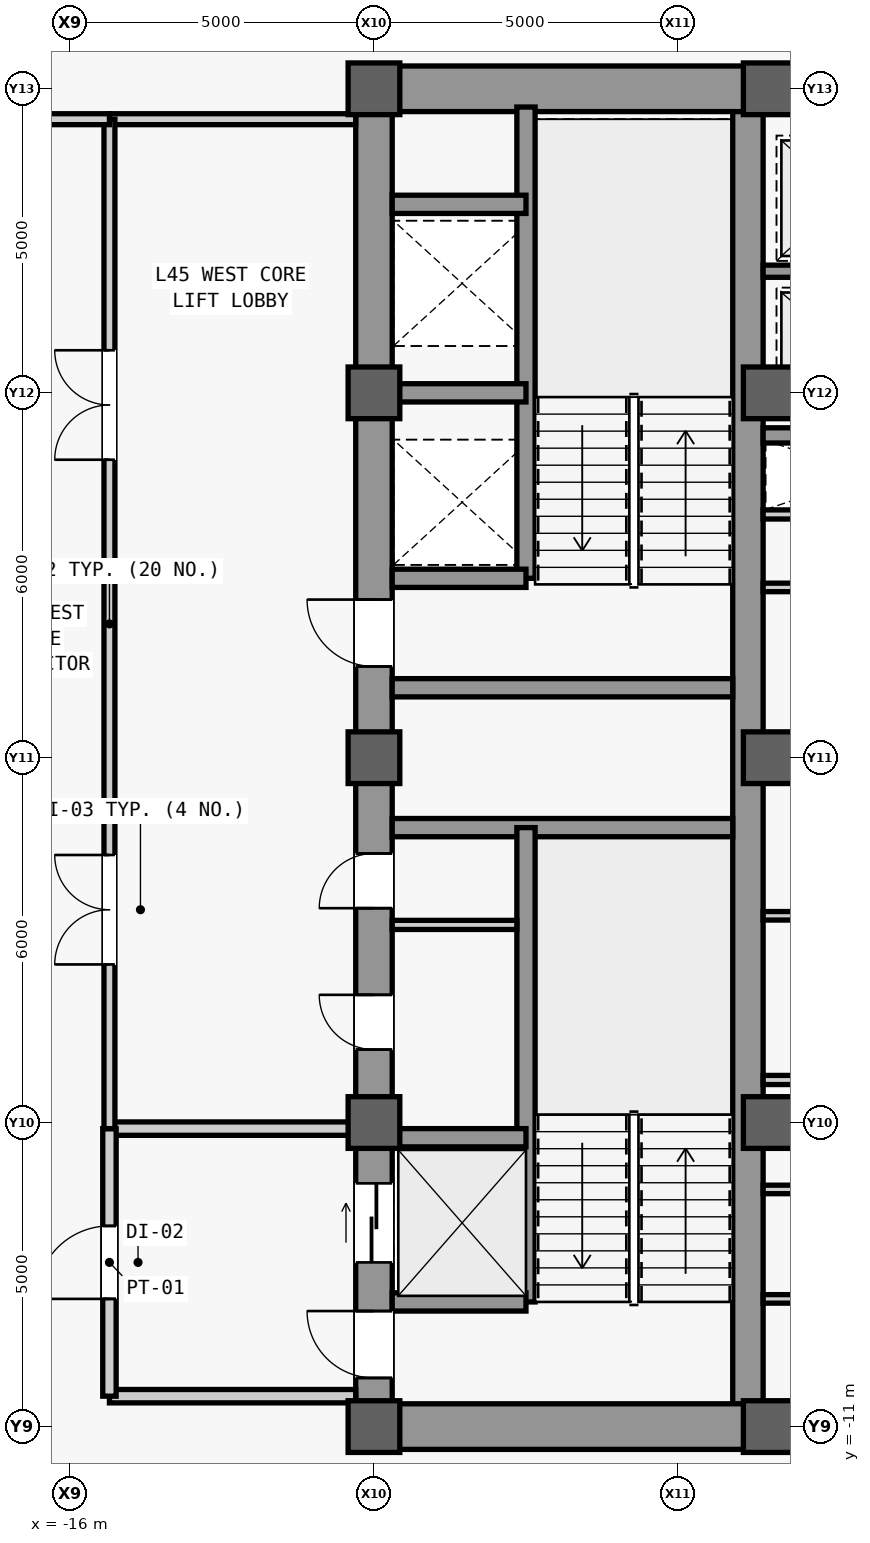
"""IFC4 building model, lengths in metres.
Left out: names, types, materials, properties, quantities, classifications, styles, units other than length and angle.
Written with IfcOpenShell. Run it as: python <this file> out.ifc"""

import sys

from ifc_helpers import new_model, si_unit, direction, frame, frame_2d, origin, origin_2d, place, context, subcontext, project, spatial, rectangle, extrude, source, transform, mapped, element, fill, save


model = new_model("IFC4")
c1 = context("Model", 3, precision=1e-05, world=origin(), true_north=direction((0.0, 1.0)))
c2 = subcontext(c1, "Body", "Model", "MODEL_VIEW")
j1 = project(units=[si_unit("LENGTHUNIT", "METRE"), si_unit("PLANEANGLEUNIT", "RADIAN")], contexts=[c1])
p1 = place(None, origin())
s1 = spatial("IfcSite", under=j1, at=p1, CompositionType="ELEMENT")
p2 = place(p1, origin())
s2 = spatial("IfcBuilding", under=s1, at=p2, CompositionType="ELEMENT")
p3 = place(p2, frame((0.0, 0.0, 195.1)))
s3 = spatial("IfcBuildingStorey", under=s2, at=p3, CompositionType="ELEMENT", Elevation=195.1)
m1 = source(origin(), c2, "Body", "SweptSolid", [
    extrude(rectangle(XDim=22.0, YDim=0.6, at=frame_2d((11.0, 0.0))), origin(), (0.0, 0.0, 1.0), 3.78),
])
p4 = place(p3, frame((-11.0, -11.0, 0.0), z_axis=(0.0, 0.0, 1.0), x_axis=(0.0, 1.0, 0.0)))
e1 = element("IfcWall", 1, at=p4, inside=s3, PredefinedType="SHEAR", context=c2, shape_type="MappedRepresentation", body=[
    mapped(m1, transform((0.0, 0.0, 0.0), scale=1.0)),
])
m2 = source(origin(), c2, "Body", "SweptSolid", [
    extrude(rectangle(XDim=1.1, YDim=2.2, at=frame_2d((0.55, 1.1))), frame((0.0, 0.31, 0.0), z_axis=(0.0, -1.0, 0.0), x_axis=(1.0, 0.0, 0.0)), (0.0, 0.0, 1.0), 0.62),
])
p5 = place(p4, frame((0.8, 0.0, 0.0)))
e2 = element("IfcOpeningElement", 2, at=p5, cuts=e1, PredefinedType="OPENING", context=c2, shape_type="MappedRepresentation", body=[
    mapped(m2, transform((0.0, 0.0, 0.0), scale=1.0)),
])
p6 = place(p4, frame((12.5, 0.0, 0.0)))
e3 = element("IfcOpeningElement", 3, at=p6, cuts=e1, PredefinedType="OPENING", context=c2, shape_type="MappedRepresentation", body=[
    mapped(m2, transform((0.0, 0.0, 0.0), scale=1.0)),
])
m3 = source(origin(), c2, "Body", "SweptSolid", [
    extrude(rectangle(XDim=0.9, YDim=2.15, at=frame_2d((0.45, 1.075))), frame((0.0, 0.31, 0.0), z_axis=(0.0, -1.0, 0.0), x_axis=(1.0, 0.0, 0.0)), (0.0, 0.0, 1.0), 0.62),
])
p7 = place(p4, frame((6.2, 0.0, 0.0)))
e4 = element("IfcOpeningElement", 4, at=p7, cuts=e1, PredefinedType="OPENING", context=c2, shape_type="MappedRepresentation", body=[
    mapped(m3, transform((0.0, 0.0, 0.0), scale=1.0)),
])
p8 = place(p4, frame((8.525, 0.0, 0.0)))
e5 = element("IfcOpeningElement", 5, at=p8, cuts=e1, PredefinedType="OPENING", context=c2, shape_type="MappedRepresentation", body=[
    mapped(m3, transform((0.0, 0.0, 0.0), scale=1.0)),
])
m4 = source(origin(), c2, "Body", "SweptSolid", [
    extrude(rectangle(XDim=1.3, YDim=2.3, at=frame_2d((0.65, 1.15))), frame((0.0, 0.31, 0.0), z_axis=(0.0, -1.0, 0.0), x_axis=(1.0, 0.0, 0.0)), (0.0, 0.0, 1.0), 0.62),
])
p9 = place(p4, frame((2.7, 0.0, 0.0)))
e6 = element("IfcOpeningElement", 6, at=p9, cuts=e1, PredefinedType="OPENING", context=c2, shape_type="MappedRepresentation", body=[
    mapped(m4, transform((0.0, 0.0, 0.0), scale=1.0)),
])
m5 = source(origin(), c2, "Body", "SweptSolid", [
    extrude(rectangle(XDim=21.4, YDim=0.5, at=frame_2d((10.7, 0.0))), origin(), (0.0, 0.0, 1.0), 3.78),
])
p10 = place(p3, frame((-4.85, -10.7, 0.0), z_axis=(0.0, 0.0, 1.0), x_axis=(0.0, 1.0, 0.0)))
e7 = element("IfcWall", 7, at=p10, inside=s3, PredefinedType="SHEAR", context=c2, shape_type="MappedRepresentation", body=[
    mapped(m5, transform((0.0, 0.0, 0.0), scale=1.0)),
])
m6 = source(origin(), c2, "Body", "SweptSolid", [
    extrude(rectangle(XDim=5.85, YDim=0.75, at=frame_2d((2.925, 0.0))), origin(), (0.0, 0.0, 1.0), 3.78),
])
for number, where, z_axis, x_axis in (
    (8, (-10.7, -11.0, 0.0), (0.0, 0.0, 1.0), (1.0, 0.0, 0.0)),
    (9, (-10.7, 11.0, 0.0), (0.0, 0.0, 1.0), (1.0, 0.0, 0.0)),
):
    element("IfcWall", number, at=place(p3, frame(where, z_axis=z_axis, x_axis=x_axis)), inside=s3, PredefinedType="SHEAR", context=c2, shape_type="MappedRepresentation", body=[
        mapped(m6, transform((0.0, 0.0, 0.0), scale=1.0)),
    ])
m7 = source(origin(), c2, "Body", "SweptSolid", [
    extrude(rectangle(XDim=5.6, YDim=0.3, at=frame_2d((2.8, 0.0))), origin(), (0.0, 0.0, 1.0), 3.78),
])
for number, where, z_axis, x_axis in (
    (10, (-10.7, -1.15, 0.0), (0.0, 0.0, 1.0), (1.0, 0.0, 0.0)),
    (11, (-10.7, 1.15, 0.0), (0.0, 0.0, 1.0), (1.0, 0.0, 0.0)),
):
    element("IfcWall", number, at=place(p3, frame(where, z_axis=z_axis, x_axis=x_axis)), inside=s3, PredefinedType="SHEAR", context=c2, shape_type="MappedRepresentation", body=[
        mapped(m7, transform((0.0, 0.0, 0.0), scale=1.0)),
    ])
m8 = source(origin(), c2, "Body", "SweptSolid", [
    extrude(rectangle(XDim=9.2, YDim=0.5, at=frame_2d((4.6, 0.0))), origin(), (0.0, 0.0, 1.0), 3.78),
])
p11 = place(p3, frame((-4.6, -11.0, 0.0), z_axis=(0.0, 0.0, 1.0), x_axis=(1.0, 0.0, 0.0)))
e12 = element("IfcWall", 12, at=p11, inside=s3, PredefinedType="SHEAR", context=c2, shape_type="MappedRepresentation", body=[
    mapped(m8, transform((0.0, 0.0, 0.0), scale=1.0)),
])
m9 = source(origin(), c2, "Body", "SweptSolid", [
    extrude(rectangle(XDim=1.8, YDim=2.25, at=frame_2d((0.9, 1.125))), frame((0.0, 0.26, 0.0), z_axis=(0.0, -1.0, 0.0), x_axis=(1.0, 0.0, 0.0)), (0.0, 0.0, 1.0), 0.52),
])
p12 = place(p11, frame((3.7, 0.0, 0.0)))
e13 = element("IfcOpeningElement", 13, at=p12, cuts=e12, PredefinedType="OPENING", context=c2, shape_type="MappedRepresentation", body=[
    mapped(m9, transform((0.0, 0.0, 0.0), scale=1.0)),
])
p13 = place(p3, frame((-4.6, 11.0, 0.0), z_axis=(0.0, 0.0, 1.0), x_axis=(1.0, 0.0, 0.0)))
e14 = element("IfcWall", 14, at=p13, inside=s3, PredefinedType="SHEAR", context=c2, shape_type="MappedRepresentation", body=[
    mapped(m8, transform((0.0, 0.0, 0.0), scale=1.0)),
])
p14 = place(p13, frame((3.7, 0.0, 0.0)))
e15 = element("IfcOpeningElement", 15, at=p14, cuts=e14, PredefinedType="OPENING", context=c2, shape_type="MappedRepresentation", body=[
    mapped(m9, transform((0.0, 0.0, 0.0), scale=1.0)),
])
m10 = source(origin(), c2, "Body", "SweptSolid", [
    extrude(rectangle(XDim=0.85, YDim=0.85, at=origin_2d()), origin(), (0.0, 0.0, 1.0), 4.0),
])
for number, where, z_axis, x_axis in (
    (16, (-11.0, -11.0, 0.0), (0.0, 0.0, 1.0), (1.0, 0.0, 0.0)),
    (17, (-11.0, -6.0, 0.0), (0.0, 0.0, 1.0), (1.0, 0.0, 0.0)),
    (18, (-11.0, 0.0, 0.0), (0.0, 0.0, 1.0), (1.0, 0.0, 0.0)),
    (19, (-11.0, 6.0, 0.0), (0.0, 0.0, 1.0), (1.0, 0.0, 0.0)),
    (20, (-11.0, 11.0, 0.0), (0.0, 0.0, 1.0), (1.0, 0.0, 0.0)),
    (21, (-4.5, -11.0, 0.0), (0.0, 0.0, 1.0), (1.0, 0.0, 0.0)),
    (22, (-4.5, -6.0, 0.0), (0.0, 0.0, 1.0), (1.0, 0.0, 0.0)),
    (23, (-4.5, 0.0, 0.0), (0.0, 0.0, 1.0), (1.0, 0.0, 0.0)),
    (24, (-4.5, 6.0, 0.0), (0.0, 0.0, 1.0), (1.0, 0.0, 0.0)),
    (25, (-4.5, 11.0, 0.0), (0.0, 0.0, 1.0), (1.0, 0.0, 0.0)),
):
    element("IfcColumn", number, at=place(p3, frame(where, z_axis=z_axis, x_axis=x_axis)), inside=s3, PredefinedType="COLUMN", context=c2, shape_type="MappedRepresentation", body=[
        mapped(m10, transform((0.0, 0.0, 0.0), scale=1.0)),
    ])
m11 = source(origin(), c2, "Body", "SweptSolid", [
    extrude(rectangle(XDim=7.8, YDim=0.3, at=frame_2d((3.9, 0.0))), origin(), (0.0, 0.0, 1.0), 3.78),
])
p15 = place(p3, frame((-8.5, -8.95, 0.0), z_axis=(0.0, 0.0, 1.0), x_axis=(0.0, 1.0, 0.0)))
e26 = element("IfcWall", 26, at=p15, inside=s3, PredefinedType="SHEAR", context=c2, shape_type="MappedRepresentation", body=[
    mapped(m11, transform((0.0, 0.0, 0.0), scale=1.0)),
])
m12 = source(origin(), c2, "Body", "SweptSolid", [
    extrude(rectangle(XDim=2.2, YDim=0.3, at=frame_2d((1.1, 0.0))), origin(), (0.0, 0.0, 1.0), 3.78),
])
for number, where, z_axis, x_axis in (
    (27, (-10.7, -8.95, 0.0), (0.0, 0.0, 1.0), (1.0, 0.0, 0.0)),
    (28, (-10.7, -6.25, 0.0), (0.0, 0.0, 1.0), (1.0, 0.0, 0.0)),
):
    element("IfcWall", number, at=place(p3, frame(where, z_axis=z_axis, x_axis=x_axis)), inside=s3, PredefinedType="SHEAR", context=c2, shape_type="MappedRepresentation", body=[
        mapped(m12, transform((0.0, 0.0, 0.0), scale=1.0)),
    ])
m13 = source(origin(), c2, "Body", "SweptSolid", [
    extrude(rectangle(XDim=7.75, YDim=0.3, at=frame_2d((3.875, 0.0))), origin(), (0.0, 0.0, 1.0), 3.78),
])
p16 = place(p3, frame((-8.5, 2.95, 0.0), z_axis=(0.0, 0.0, 1.0), x_axis=(0.0, 1.0, 0.0)))
e29 = element("IfcWall", 29, at=p16, inside=s3, PredefinedType="SHEAR", context=c2, shape_type="MappedRepresentation", body=[
    mapped(m13, transform((0.0, 0.0, 0.0), scale=1.0)),
])
for number, where, z_axis, x_axis in (
    (30, (-10.7, 2.95, 0.0), (0.0, 0.0, 1.0), (1.0, 0.0, 0.0)),
    (31, (-10.7, 6.0, 0.0), (0.0, 0.0, 1.0), (1.0, 0.0, 0.0)),
    (32, (-10.7, 9.1, 0.0), (0.0, 0.0, 1.0), (1.0, 0.0, 0.0)),
):
    element("IfcWall", number, at=place(p3, frame(where, z_axis=z_axis, x_axis=x_axis)), inside=s3, PredefinedType="SHEAR", context=c2, shape_type="MappedRepresentation", body=[
        mapped(m12, transform((0.0, 0.0, 0.0), scale=1.0)),
    ])
m14 = source(origin(), c2, "Body", "SweptSolid", [
    extrude(rectangle(XDim=2.05, YDim=0.15, at=frame_2d((1.025, 0.0))), origin(), (0.0, 0.0, 1.0), 3.78),
])
p17 = place(p3, frame((-10.7, -2.75, 0.0), z_axis=(0.0, 0.0, 1.0), x_axis=(1.0, 0.0, 0.0)))
e33 = element("IfcWall", 33, at=p17, inside=s3, PredefinedType="PARTITIONING", context=c2, shape_type="MappedRepresentation", body=[
    mapped(m14, transform((0.0, 0.0, 0.0), scale=1.0)),
])
m15 = source(origin(), c2, "Body", "SweptSolid", [
    extrude(rectangle(XDim=4.05, YDim=0.22, at=frame_2d((2.025, 0.0))), origin(), (0.0, 0.0, 1.0), 3.78),
])
p18 = place(p3, frame((-15.35, -10.5, 0.0), z_axis=(0.0, 0.0, 1.0), x_axis=(1.0, 0.0, 0.0)))
e34 = element("IfcWall", 34, at=p18, inside=s3, PredefinedType="PARTITIONING", context=c2, shape_type="MappedRepresentation", body=[
    mapped(m15, transform((0.0, 0.0, 0.0), scale=1.0)),
])
m16 = source(origin(), c2, "Body", "SweptSolid", [
    extrude(rectangle(XDim=4.05, YDim=0.22, at=frame_2d((2.025, 0.0))), origin(), (0.0, 0.0, 1.0), 3.007),
])
p19 = place(p3, frame((-15.35, -6.1, 0.0), z_axis=(0.0, 0.0, 1.0), x_axis=(1.0, 0.0, 0.0)))
e35 = element("IfcWall", 35, at=p19, inside=s3, PredefinedType="PARTITIONING", context=c2, shape_type="MappedRepresentation", body=[
    mapped(m16, transform((0.0, 0.0, 0.0), scale=1.0)),
])
m17 = source(origin(), c2, "Body", "SweptSolid", [
    extrude(rectangle(XDim=4.4, YDim=0.22, at=frame_2d((2.2, 0.0))), origin(), (0.0, 0.0, 1.0), 3.78),
])
p20 = place(p3, frame((-15.35, -10.5, 0.0), z_axis=(0.0, 0.0, 1.0), x_axis=(0.0, 1.0, 0.0)))
e36 = element("IfcWall", 36, at=p20, inside=s3, PredefinedType="PARTITIONING", context=c2, shape_type="MappedRepresentation", body=[
    mapped(m17, transform((0.0, 0.0, 0.0), scale=1.0)),
])
m18 = source(origin(), c2, "Body", "SweptSolid", [
    extrude(rectangle(XDim=1.2, YDim=2.2, at=frame_2d((0.6, 1.1))), frame((0.0, 0.12, 0.0), z_axis=(0.0, -1.0, 0.0), x_axis=(1.0, 0.0, 0.0)), (0.0, 0.0, 1.0), 0.24),
])
p21 = place(p20, frame((1.6, 0.0, 0.0)))
e37 = element("IfcOpeningElement", 37, at=p21, cuts=e36, PredefinedType="OPENING", context=c2, shape_type="MappedRepresentation", body=[
    mapped(m18, transform((0.0, 0.0, 0.0), scale=1.0)),
])
m19 = source(origin(), c2, "Body", "SweptSolid", [
    extrude(rectangle(XDim=4.05, YDim=0.18, at=frame_2d((2.025, 0.0))), origin(), (0.0, 0.0, 1.0), 3.78),
])
p22 = place(p3, frame((-15.35, 10.5, 0.0), z_axis=(0.0, 0.0, 1.0), x_axis=(1.0, 0.0, 0.0)))
e38 = element("IfcWall", 38, at=p22, inside=s3, PredefinedType="PARTITIONING", context=c2, shape_type="MappedRepresentation", body=[
    mapped(m19, transform((0.0, 0.0, 0.0), scale=1.0)),
])
m20 = source(origin(), c2, "Body", "SweptSolid", [
    extrude(rectangle(XDim=16.6, YDim=0.18, at=frame_2d((8.3, 0.0))), origin(), (0.0, 0.0, 1.0), 3.78),
])
p23 = place(p3, frame((-15.35, -6.1, 0.0), z_axis=(0.0, 0.0, 1.0), x_axis=(0.0, 1.0, 0.0)))
e39 = element("IfcWall", 39, at=p23, inside=s3, PredefinedType="PARTITIONING", context=c2, shape_type="MappedRepresentation", body=[
    mapped(m20, transform((0.0, 0.0, 0.0), scale=1.0)),
])
m21 = source(origin(), c2, "Body", "SweptSolid", [
    extrude(rectangle(XDim=1.8, YDim=2.25, at=frame_2d((0.9, 1.125))), frame((0.0, 0.1, 0.0), z_axis=(0.0, -1.0, 0.0), x_axis=(1.0, 0.0, 0.0)), (0.0, 0.0, 1.0), 0.2),
])
p24 = place(p23, frame((2.7, 0.0, 0.0)))
e40 = element("IfcOpeningElement", 40, at=p24, cuts=e39, PredefinedType="OPENING", context=c2, shape_type="MappedRepresentation", body=[
    mapped(m21, transform((0.0, 0.0, 0.0), scale=1.0)),
])
p25 = place(p23, frame((11.0, 0.0, 0.0)))
e41 = element("IfcOpeningElement", 41, at=p25, cuts=e39, PredefinedType="OPENING", context=c2, shape_type="MappedRepresentation", body=[
    mapped(m21, transform((0.0, 0.0, 0.0), scale=1.0)),
])
m22 = source(origin(), c2, "Body", "SweptSolid", [
    extrude(rectangle(XDim=3.45, YDim=0.15, at=frame_2d((1.725, 0.0))), origin(), (0.0, 0.0, 1.0), 3.78),
])
p26 = place(p3, frame((-4.6, 4.0, 0.0), z_axis=(0.0, 0.0, 1.0), x_axis=(1.0, 0.0, 0.0)))
e42 = element("IfcWall", 42, at=p26, inside=s3, PredefinedType="PARTITIONING", context=c2, shape_type="MappedRepresentation", body=[
    mapped(m22, transform((0.0, 0.0, 0.0), scale=1.0)),
])
m23 = source(origin(), c2, "Body", "SweptSolid", [
    extrude(rectangle(XDim=3.45, YDim=0.14, at=frame_2d((1.725, 0.0))), origin(), (0.0, 0.0, 1.0), 3.78),
])
for number, where, z_axis, x_axis in (
    (43, (-4.6, -8.9, 0.0), (0.0, 0.0, 1.0), (1.0, 0.0, 0.0)),
    (44, (-4.6, -7.1, 0.0), (0.0, 0.0, 1.0), (1.0, 0.0, 0.0)),
):
    element("IfcWall", number, at=place(p3, frame(where, z_axis=z_axis, x_axis=x_axis)), inside=s3, PredefinedType="PARTITIONING", context=c2, shape_type="MappedRepresentation", body=[
        mapped(m23, transform((0.0, 0.0, 0.0), scale=1.0)),
    ])
p27 = place(p3, frame((-4.6, -5.3, 0.0), z_axis=(0.0, 0.0, 1.0), x_axis=(1.0, 0.0, 0.0)))
e45 = element("IfcWall", 45, at=p27, inside=s3, PredefinedType="PARTITIONING", context=c2, shape_type="MappedRepresentation", body=[
    mapped(m22, transform((0.0, 0.0, 0.0), scale=1.0)),
])
m24 = source(origin(), c2, "Body", "SweptSolid", [
    extrude(rectangle(XDim=2.45, YDim=0.2, at=frame_2d((1.225, 0.0))), origin(), (0.0, 0.0, 1.0), 3.78),
])
p28 = place(p3, frame((-4.6, 8.0, 0.0), z_axis=(0.0, 0.0, 1.0), x_axis=(1.0, 0.0, 0.0)))
e46 = element("IfcWall", 46, at=p28, inside=s3, PredefinedType="SHEAR", context=c2, shape_type="MappedRepresentation", body=[
    mapped(m24, transform((0.0, 0.0, 0.0), scale=1.0)),
])
m25 = source(origin(), c2, "Body", "SweptSolid", [
    extrude(rectangle(XDim=9.2, YDim=0.25, at=frame_2d((4.6, 0.0))), origin(), (0.0, 0.0, 1.0), 3.78),
])
p29 = place(p3, frame((-4.6, 5.3, 0.0), z_axis=(0.0, 0.0, 1.0), x_axis=(1.0, 0.0, 0.0)))
e47 = element("IfcWall", 47, at=p29, inside=s3, PredefinedType="SHEAR", context=c2, shape_type="MappedRepresentation", body=[
    mapped(m25, transform((0.0, 0.0, 0.0), scale=1.0)),
])
m26 = source(origin(), c2, "Body", "SweptSolid", [
    extrude(rectangle(XDim=1.05, YDim=2.2, at=frame_2d((0.525, 1.1))), frame((0.0, 0.135, 0.0), z_axis=(0.0, -1.0, 0.0), x_axis=(1.0, 0.0, 0.0)), (0.0, 0.0, 1.0), 0.27),
])
p30 = place(p29, frame((4.075, 0.0, 0.0)))
e48 = element("IfcOpeningElement", 48, at=p30, cuts=e47, PredefinedType="OPENING", context=c2, shape_type="MappedRepresentation", body=[
    mapped(m26, transform((0.0, 0.0, 0.0), scale=1.0)),
])
p31 = place(p3, frame((-4.6, -2.6, 0.0), z_axis=(0.0, 0.0, 1.0), x_axis=(1.0, 0.0, 0.0)))
e49 = element("IfcWall", 49, at=p31, inside=s3, PredefinedType="PARTITIONING", context=c2, shape_type="MappedRepresentation", body=[
    mapped(m23, transform((0.0, 0.0, 0.0), scale=1.0)),
])
m27 = source(origin(), c2, "Body", "SweptSolid", [
    extrude(rectangle(XDim=3.45, YDim=0.14, at=frame_2d((1.725, 0.0))), origin(), (0.0, 0.0, 1.0), 3.085),
])
p32 = place(p3, frame((-4.6, 0.2, 0.0), z_axis=(0.0, 0.0, 1.0), x_axis=(1.0, 0.0, 0.0)))
e50 = element("IfcWall", 50, at=p32, inside=s3, PredefinedType="PARTITIONING", context=c2, shape_type="MappedRepresentation", body=[
    mapped(m27, transform((0.0, 0.0, 0.0), scale=1.0)),
])
p33 = place(p3, frame((-4.6, 2.8, 0.0), z_axis=(0.0, 0.0, 1.0), x_axis=(1.0, 0.0, 0.0)))
e51 = element("IfcWall", 51, at=p33, inside=s3, PredefinedType="PARTITIONING", context=c2, shape_type="MappedRepresentation", body=[
    mapped(m23, transform((0.0, 0.0, 0.0), scale=1.0)),
])
m28 = source(origin(), c2, "Body", "SweptSolid", [
    extrude(rectangle(XDim=2.45, YDim=0.18, at=frame_2d((1.225, 0.0))), origin(), (0.0, 0.0, 1.0), 3.78),
])
p34 = place(p3, frame((-17.8, 10.5, 0.0), z_axis=(0.0, 0.0, 1.0), x_axis=(1.0, 0.0, 0.0)))
e52 = element("IfcWall", 52, at=p34, inside=s3, PredefinedType="PARTITIONING", context=c2, shape_type="MappedRepresentation", body=[
    mapped(m28, transform((0.0, 0.0, 0.0), scale=1.0)),
])
m29 = source(origin(), c2, "Body", "SweptSolid", [
    extrude(rectangle(XDim=1.1, YDim=2.2, at=frame_2d((0.55, 1.1))), frame((0.0, 0.025, 0.0), z_axis=(0.0, -1.0, 0.0), x_axis=(1.0, 0.0, 0.0)), (0.0, 0.0, 1.0), 0.05),
])
p35 = place(p5, origin())
e53 = element("IfcDoor", 53, at=p35, inside=s3, OperationType="SINGLE_SWING_RIGHT", PredefinedType="DOOR", context=c2, shape_type="MappedRepresentation", body=[
    mapped(m29, transform((0.0, 0.0, 0.0), scale=1.0)),
])
fill(e2, e53)
p36 = place(p6, origin())
e54 = element("IfcDoor", 54, at=p36, inside=s3, OperationType="SINGLE_SWING_RIGHT", PredefinedType="DOOR", context=c2, shape_type="MappedRepresentation", body=[
    mapped(m29, transform((0.0, 0.0, 0.0), scale=1.0)),
])
fill(e3, e54)
m30 = source(origin(), c2, "Body", "SweptSolid", [
    extrude(rectangle(XDim=0.9, YDim=2.15, at=frame_2d((0.45, 1.075))), frame((0.0, 0.025, 0.0), z_axis=(0.0, -1.0, 0.0), x_axis=(1.0, 0.0, 0.0)), (0.0, 0.0, 1.0), 0.05),
])
p37 = place(p7, origin())
e55 = element("IfcDoor", 55, at=p37, inside=s3, OperationType="SINGLE_SWING_RIGHT", PredefinedType="DOOR", context=c2, shape_type="MappedRepresentation", body=[
    mapped(m30, transform((0.0, 0.0, 0.0), scale=1.0)),
])
fill(e4, e55)
p38 = place(p8, origin())
e56 = element("IfcDoor", 56, at=p38, inside=s3, OperationType="SINGLE_SWING_LEFT", PredefinedType="DOOR", context=c2, shape_type="MappedRepresentation", body=[
    mapped(m30, transform((0.0, 0.0, 0.0), scale=1.0)),
])
fill(e5, e56)
m31 = source(origin(), c2, "Body", "SweptSolid", [
    extrude(rectangle(XDim=1.2, YDim=2.2, at=frame_2d((0.6, 1.1))), frame((0.0, 0.025, 0.0), z_axis=(0.0, -1.0, 0.0), x_axis=(1.0, 0.0, 0.0)), (0.0, 0.0, 1.0), 0.05),
])
p39 = place(p21, origin())
e57 = element("IfcDoor", 57, at=p39, inside=s3, OperationType="SINGLE_SWING_LEFT", PredefinedType="DOOR", context=c2, shape_type="MappedRepresentation", body=[
    mapped(m31, transform((0.0, 0.0, 0.0), scale=1.0)),
])
fill(e37, e57)
m32 = source(origin(), c2, "Body", "SweptSolid", [
    extrude(rectangle(XDim=1.8, YDim=2.25, at=frame_2d((0.9, 1.125))), frame((0.0, 0.025, 0.0), z_axis=(0.0, -1.0, 0.0), x_axis=(1.0, 0.0, 0.0)), (0.0, 0.0, 1.0), 0.05),
])
p40 = place(p24, origin())
e58 = element("IfcDoor", 58, at=p40, inside=s3, OperationType="SINGLE_SWING_LEFT", PredefinedType="DOOR", context=c2, shape_type="MappedRepresentation", body=[
    mapped(m32, transform((0.0, 0.0, 0.0), scale=1.0)),
])
fill(e40, e58)
p41 = place(p25, origin())
e59 = element("IfcDoor", 59, at=p41, inside=s3, OperationType="SINGLE_SWING_RIGHT", PredefinedType="DOOR", context=c2, shape_type="MappedRepresentation", body=[
    mapped(m32, transform((0.0, 0.0, 0.0), scale=1.0)),
])
fill(e41, e59)
m33 = source(origin(), c2, "Body", "SweptSolid", [
    extrude(rectangle(XDim=1.3, YDim=2.3, at=frame_2d((0.65, 1.15))), frame((0.0, 0.025, 0.0), z_axis=(0.0, -1.0, 0.0), x_axis=(1.0, 0.0, 0.0)), (0.0, 0.0, 1.0), 0.05),
])
p42 = place(p9, origin())
e60 = element("IfcDoor", 60, at=p42, inside=s3, OperationType="SLIDING_TO_LEFT", PredefinedType="DOOR", context=c2, shape_type="MappedRepresentation", body=[
    mapped(m33, transform((0.0, 0.0, 0.0), scale=1.0)),
])
fill(e6, e60)
save(model, sys.argv[1])
